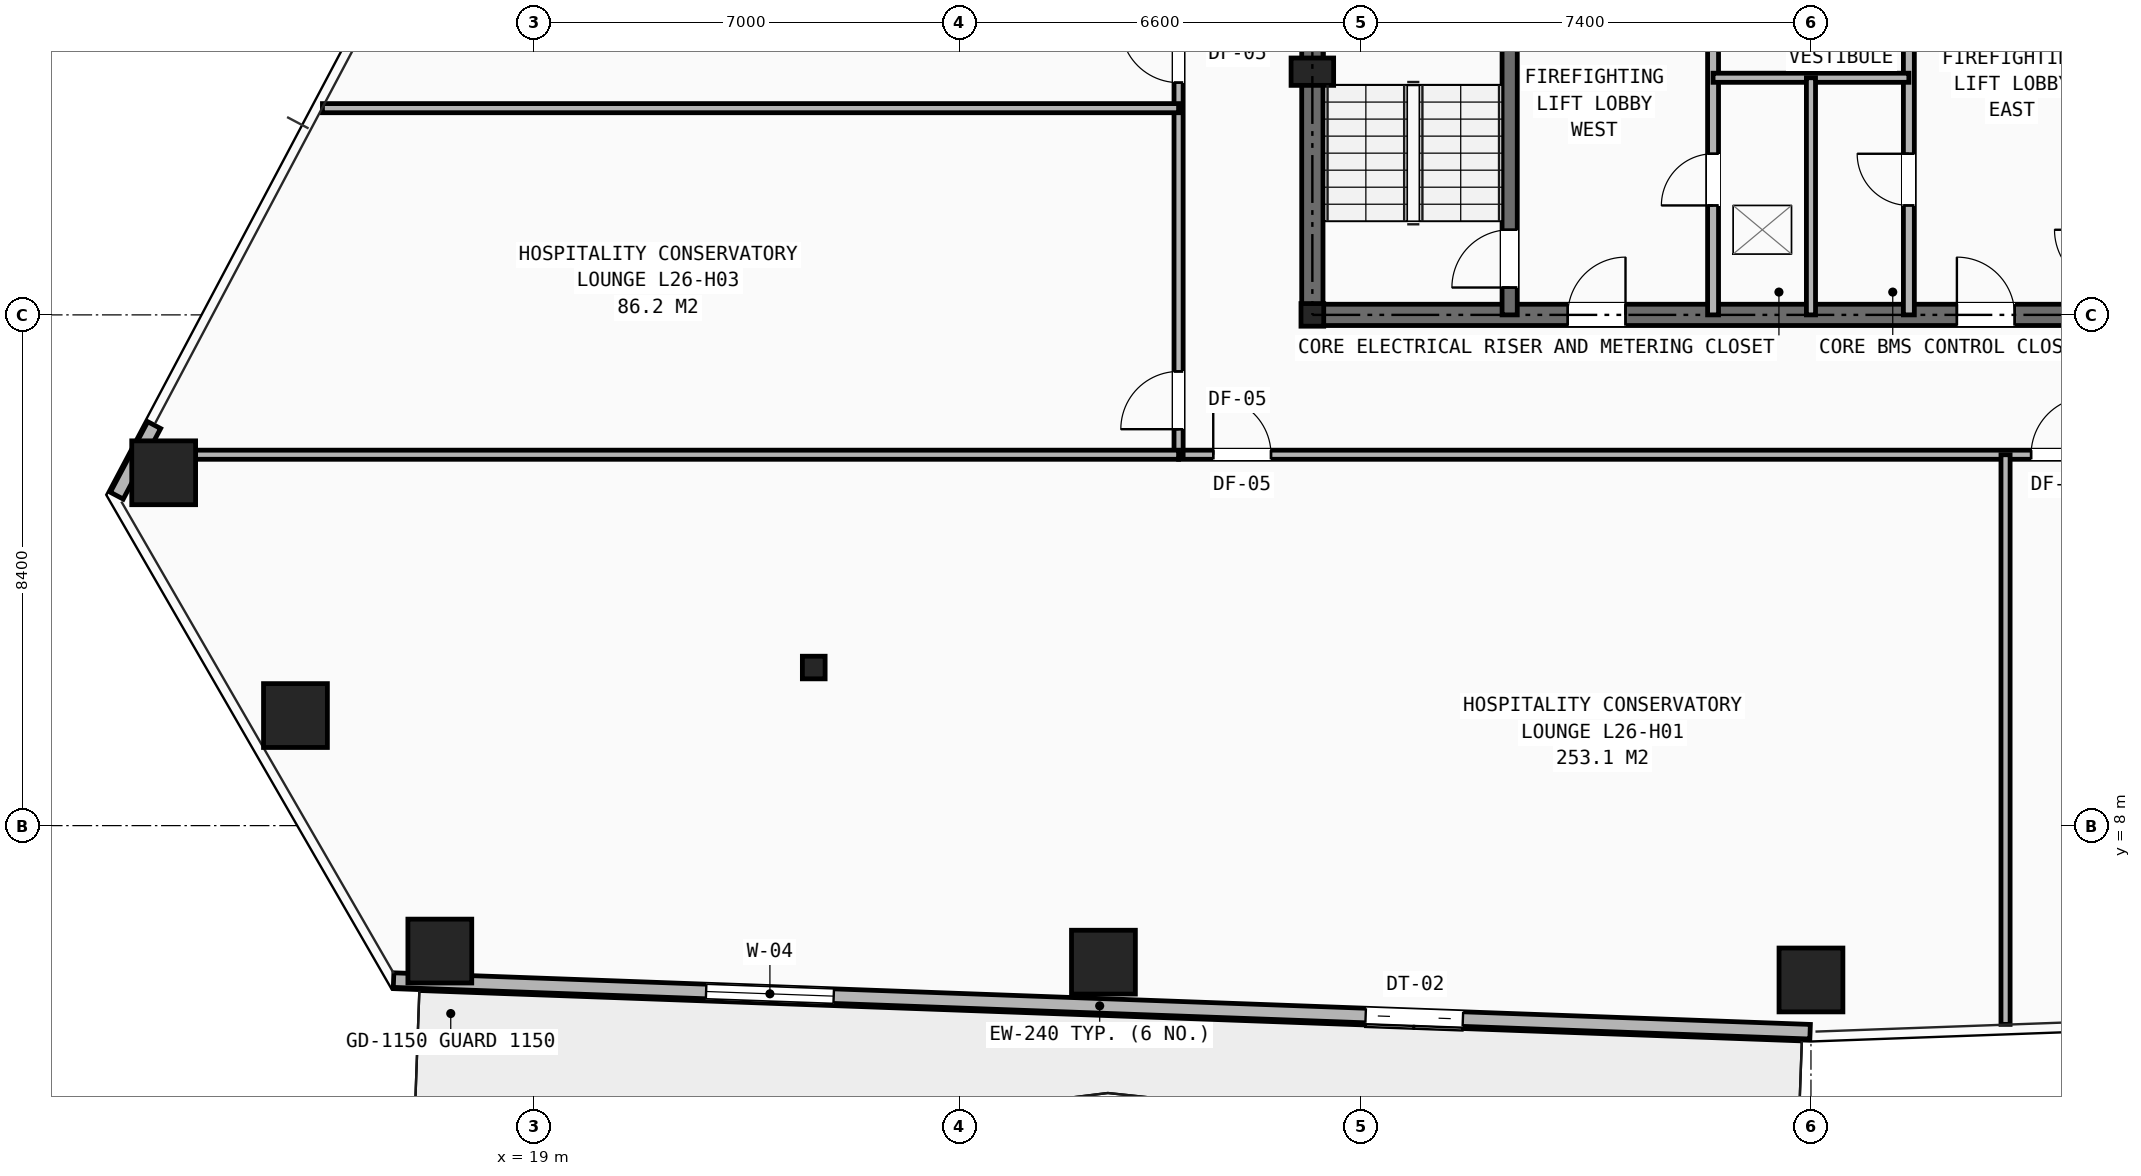
"""IFC4 building model, lengths in metres.
Left out: names, types, materials, properties, quantities, classifications, styles, units other than length and angle.
Written with IfcOpenShell. Run it as: python <this file> out.ifc"""

import sys

from ifc_helpers import new_model, si_unit, direction, frame, frame_2d, origin, origin_2d, place, context, subcontext, project, spatial, rectangle, hollow_rectangle, i_section, extrude, element, fill, save


model = new_model("IFC4")
c1 = context("Model", 3, precision=1e-05, world=origin(), true_north=direction((0.0, 1.0)))
c2 = subcontext(c1, "Body", "Model", "MODEL_VIEW")
j1 = project(units=[si_unit("LENGTHUNIT", "METRE"), si_unit("PLANEANGLEUNIT", "RADIAN")], contexts=[c1])
p1 = place(None, origin())
s1 = spatial("IfcSite", under=j1, at=p1, CompositionType="ELEMENT")
p2 = place(p1, origin())
s2 = spatial("IfcBuilding", under=s1, at=p2, CompositionType="ELEMENT")
p3 = place(p2, frame((0.0, 0.0, 92.6)))
s3 = spatial("IfcBuildingStorey", under=s2, at=p3, CompositionType="ELEMENT", Elevation=92.6)
for number, where, z_axis, x_axis in (
    (1, (31.8, 16.4, 0.0), (0.0, 0.0, 1.0), (1.0, 0.0, 0.0)),
    (2, (23.6, 10.6, 0.0), (0.0, 0.0, 1.0), (1.0, 0.0, 0.0)),
):
    element("IfcColumn", number, at=place(p3, frame(where, z_axis=z_axis, x_axis=x_axis)), inside=s3, PredefinedType="COLUMN", context=c2, shape_type="SweptSolid", body=[
        extrude(i_section(OverallWidth=0.374, OverallDepth=0.372, WebThickness=0.016, FlangeThickness=0.026, at=origin_2d()), origin(), (0.0, 0.0, 1.0), 3.2),
    ])
p4 = place(p3, frame((31.8, 20.4, 0.0), z_axis=(0.0, 0.0, 1.0), x_axis=(1.0, 0.0, 0.0)))
e3 = element("IfcColumn", 3, at=p4, inside=s3, PredefinedType="PILASTER", context=c2, shape_type="SweptSolid", body=[
    extrude(rectangle(XDim=0.7, YDim=0.45, at=origin_2d()), origin(), (0.0, 0.0, 1.0), 3.2),
])
for number, where, z_axis, x_axis in (
    (4, (12.909, 13.803, 0.0), (0.0, 0.0, 1.0), (1.0, 0.0, 0.0)),
    (5, (15.076, 9.81, 0.0), (0.0, 0.0, 1.0), (1.0, 0.0, 0.0)),
    (6, (17.451, 5.937, 0.0), (0.0, 0.0, 1.0), (1.0, 0.0, 0.0)),
    (7, (28.364, 5.754, 0.0), (0.0, 0.0, 1.0), (1.0, 0.0, 0.0)),
    (8, (40.0, 5.461, 0.0), (0.0, 0.0, 1.0), (1.0, 0.0, 0.0)),
):
    element("IfcColumn", number, at=place(p3, frame(where, z_axis=z_axis, x_axis=x_axis)), inside=s3, PredefinedType="COLUMN", context=c2, shape_type="SweptSolid", body=[
        extrude(hollow_rectangle(XDim=1.05, YDim=1.05, WallThickness=0.07, at=origin_2d()), origin(), (0.0, 0.0, 1.0), 3.2),
    ])
p5 = place(p3, frame((12.753, 14.587, 0.0), z_axis=(0.0, 0.0, 1.0), x_axis=(-0.468058524958, -0.883697469281, 0.0)))
e9 = element("IfcWall", 9, at=p5, inside=s3, PredefinedType="SHEAR", context=c2, shape_type="SweptSolid", body=[
    extrude(rectangle(XDim=1.313, YDim=0.24, at=frame_2d((0.657, 0.0))), origin(), (0.0, 0.0, 1.0), 2.253),
])
p6 = place(p3, frame((39.986, 4.61, 0.0), z_axis=(0.0, 0.0, 1.0), x_axis=(-0.999336382455, 0.036425193232, 0.0)))
e10 = element("IfcWall", 10, at=p6, inside=s3, PredefinedType="SHEAR", context=c2, shape_type="SweptSolid", body=[
    extrude(rectangle(XDim=23.311, YDim=0.24, at=frame_2d((11.656, 0.0))), origin(), (0.0, 0.0, 1.0), 2.253),
])
p7 = place(p6, frame((5.714, 0.0, 0.0)))
e11 = element("IfcOpeningElement", 11, at=p7, cuts=e10, PredefinedType="OPENING", context=c2, shape_type="SweptSolid", body=[
    extrude(rectangle(XDim=1.6, YDim=2.04, at=frame_2d((0.8, 1.02))), frame((0.0, 0.13, 0.0), z_axis=(0.0, -1.0, 0.0), x_axis=(1.0, 0.0, 0.0)), (0.0, 0.0, 1.0), 0.26),
])
p8 = place(p6, frame((16.068, 0.0, 0.25)))
e12 = element("IfcOpeningElement", 12, at=p8, cuts=e10, PredefinedType="OPENING", context=c2, shape_type="SweptSolid", body=[
    extrude(rectangle(XDim=2.1, YDim=1.7, at=frame_2d((1.05, 0.85))), frame((0.0, 0.13, 0.0), z_axis=(0.0, -1.0, 0.0), x_axis=(1.0, 0.0, 0.0)), (0.0, 0.0, 1.0), 0.26),
])
p9 = place(p3, frame((31.8, 16.4, 0.0), z_axis=(0.0, 0.0, 1.0), x_axis=(1.0, 0.0, 0.0)))
e13 = element("IfcWall", 13, at=p9, inside=s3, PredefinedType="SHEAR", context=c2, shape_type="SweptSolid", body=[
    extrude(rectangle(XDim=16.4, YDim=0.35, at=frame_2d((8.2, 0.0))), origin(), (0.0, 0.0, 1.0), 2.97),
])
p10 = place(p9, frame((4.2, 0.0, 0.0)))
e14 = element("IfcOpeningElement", 14, at=p10, cuts=e13, PredefinedType="OPENING", context=c2, shape_type="SweptSolid", body=[
    extrude(rectangle(XDim=0.95, YDim=2.1, at=frame_2d((0.475, 1.05))), frame((0.0, 0.185, 0.0), z_axis=(0.0, -1.0, 0.0), x_axis=(1.0, 0.0, 0.0)), (0.0, 0.0, 1.0), 0.37),
])
p11 = place(p9, frame((10.6, 0.0, 0.0)))
e15 = element("IfcOpeningElement", 15, at=p11, cuts=e13, PredefinedType="OPENING", context=c2, shape_type="SweptSolid", body=[
    extrude(rectangle(XDim=0.95, YDim=2.1, at=frame_2d((0.475, 1.05))), frame((0.0, 0.185, 0.0), z_axis=(0.0, -1.0, 0.0), x_axis=(1.0, 0.0, 0.0)), (0.0, 0.0, 1.0), 0.37),
])
p12 = place(p3, frame((31.8, 16.4, 0.0), z_axis=(0.0, 0.0, 1.0), x_axis=(0.0, 1.0, 0.0)))
e16 = element("IfcWall", 16, at=p12, inside=s3, PredefinedType="SHEAR", context=c2, shape_type="SweptSolid", body=[
    extrude(rectangle(XDim=14.8, YDim=0.35, at=frame_2d((7.4, 0.0))), origin(), (0.0, 0.0, 1.0), 2.97),
])
p13 = place(p12, frame((11.0, 0.0, 0.0)))
e17 = element("IfcOpeningElement", 17, at=p13, cuts=e16, PredefinedType="OPENING", context=c2, shape_type="SweptSolid", body=[
    extrude(rectangle(XDim=1.1, YDim=2.15, at=frame_2d((0.55, 1.075))), frame((0.0, 0.185, 0.0), z_axis=(0.0, -1.0, 0.0), x_axis=(1.0, 0.0, 0.0)), (0.0, 0.0, 1.0), 0.37),
])
p14 = place(p3, frame((35.045, 16.4, 0.0), z_axis=(0.0, 0.0, 1.0), x_axis=(0.0, 1.0, 0.0)))
e18 = element("IfcWall", 18, at=p14, inside=s3, PredefinedType="SHEAR", context=c2, shape_type="SweptSolid", body=[
    extrude(rectangle(XDim=8.4, YDim=0.25, at=frame_2d((4.2, 0.0))), origin(), (0.0, 0.0, 1.0), 2.97),
])
p15 = place(p14, frame((0.45, 0.0, 0.0)))
e19 = element("IfcOpeningElement", 19, at=p15, cuts=e18, PredefinedType="OPENING", context=c2, shape_type="SweptSolid", body=[
    extrude(rectangle(XDim=0.95, YDim=2.1, at=frame_2d((0.475, 1.05))), frame((0.0, 0.135, 0.0), z_axis=(0.0, -1.0, 0.0), x_axis=(1.0, 0.0, 0.0)), (0.0, 0.0, 1.0), 0.27),
])
p16 = place(p3, frame((38.39, 16.4, 0.0), z_axis=(0.0, 0.0, 1.0), x_axis=(0.0, 1.0, 0.0)))
e20 = element("IfcWall", 20, at=p16, inside=s3, PredefinedType="PARTITIONING", context=c2, shape_type="SweptSolid", body=[
    extrude(rectangle(XDim=8.4, YDim=0.18, at=frame_2d((4.2, 0.0))), origin(), (0.0, 0.0, 1.0), 2.421),
])
p17 = place(p16, frame((1.8, 0.0, 0.0)))
e21 = element("IfcOpeningElement", 21, at=p17, cuts=e20, PredefinedType="OPENING", context=c2, shape_type="SweptSolid", body=[
    extrude(rectangle(XDim=0.85, YDim=2.05, at=frame_2d((0.425, 1.025))), frame((0.0, 0.1, 0.0), z_axis=(0.0, -1.0, 0.0), x_axis=(1.0, 0.0, 0.0)), (0.0, 0.0, 1.0), 0.2),
])
p18 = place(p16, frame((4.35, 0.0, 0.0)))
e22 = element("IfcOpeningElement", 22, at=p18, cuts=e20, PredefinedType="OPENING", context=c2, shape_type="SweptSolid", body=[
    extrude(rectangle(XDim=0.95, YDim=2.1, at=frame_2d((0.475, 1.05))), frame((0.0, 0.1, 0.0), z_axis=(0.0, -1.0, 0.0), x_axis=(1.0, 0.0, 0.0)), (0.0, 0.0, 1.0), 0.2),
])
p19 = place(p3, frame((41.61, 16.4, 0.0), z_axis=(0.0, 0.0, 1.0), x_axis=(0.0, 1.0, 0.0)))
e23 = element("IfcWall", 23, at=p19, inside=s3, PredefinedType="PARTITIONING", context=c2, shape_type="SweptSolid", body=[
    extrude(rectangle(XDim=8.4, YDim=0.18, at=frame_2d((4.2, 0.0))), origin(), (0.0, 0.0, 1.0), 2.421),
])
p20 = place(p19, frame((1.8, 0.0, 0.0)))
e24 = element("IfcOpeningElement", 24, at=p20, cuts=e23, PredefinedType="OPENING", context=c2, shape_type="SweptSolid", body=[
    extrude(rectangle(XDim=0.85, YDim=2.05, at=frame_2d((0.425, 1.025))), frame((0.0, 0.1, 0.0), z_axis=(0.0, -1.0, 0.0), x_axis=(1.0, 0.0, 0.0)), (0.0, 0.0, 1.0), 0.2),
])
p21 = place(p3, frame((38.39, 20.3, 0.0), z_axis=(0.0, 0.0, 1.0), x_axis=(1.0, 0.0, 0.0)))
e25 = element("IfcWall", 25, at=p21, inside=s3, PredefinedType="PARTITIONING", context=c2, shape_type="SweptSolid", body=[
    extrude(rectangle(XDim=3.22, YDim=0.15, at=frame_2d((1.61, 0.0))), origin(), (0.0, 0.0, 1.0), 2.97),
])
p22 = place(p3, frame((40.0, 16.4, 0.0), z_axis=(0.0, 0.0, 1.0), x_axis=(0.0, 1.0, 0.0)))
e26 = element("IfcWall", 26, at=p22, inside=s3, PredefinedType="PARTITIONING", context=c2, shape_type="SweptSolid", body=[
    extrude(rectangle(XDim=3.9, YDim=0.15, at=frame_2d((1.95, 0.0))), origin(), (0.0, 0.0, 1.0), 2.421),
])
p23 = place(p3, frame((29.6, 14.1, 0.0), z_axis=(0.0, 0.0, 1.0), x_axis=(1.0, 0.0, 0.0)))
e27 = element("IfcWall", 27, at=p23, inside=s3, PredefinedType="PARTITIONING", context=c2, shape_type="SweptSolid", body=[
    extrude(rectangle(XDim=20.8, YDim=0.15, at=frame_2d((10.4, 0.0))), origin(), (0.0, 0.0, 1.0), 2.421),
])
p24 = place(p23, frame((0.57, 0.0, 0.0)))
e28 = element("IfcOpeningElement", 28, at=p24, cuts=e27, PredefinedType="OPENING", context=c2, shape_type="SweptSolid", body=[
    extrude(rectangle(XDim=0.95, YDim=2.1, at=frame_2d((0.475, 1.05))), frame((0.0, 0.085, 0.0), z_axis=(0.0, -1.0, 0.0), x_axis=(1.0, 0.0, 0.0)), (0.0, 0.0, 1.0), 0.17),
])
p25 = place(p23, frame((14.02, 0.0, 0.0)))
e29 = element("IfcOpeningElement", 29, at=p25, cuts=e27, PredefinedType="OPENING", context=c2, shape_type="SweptSolid", body=[
    extrude(rectangle(XDim=0.95, YDim=2.1, at=frame_2d((0.475, 1.05))), frame((0.0, 0.085, 0.0), z_axis=(0.0, -1.0, 0.0), x_axis=(1.0, 0.0, 0.0)), (0.0, 0.0, 1.0), 0.17),
])
p26 = place(p3, frame((29.6, 14.1, 0.0), z_axis=(0.0, 0.0, 1.0), x_axis=(0.0, 1.0, 0.0)))
e30 = element("IfcWall", 30, at=p26, inside=s3, PredefinedType="PARTITIONING", context=c2, shape_type="SweptSolid", body=[
    extrude(rectangle(XDim=21.9, YDim=0.15, at=frame_2d((10.95, 0.0))), origin(), (0.0, 0.0, 1.0), 2.421),
])
p27 = place(p26, frame((0.42, 0.0, 0.0)))
e31 = element("IfcOpeningElement", 31, at=p27, cuts=e30, PredefinedType="OPENING", context=c2, shape_type="SweptSolid", body=[
    extrude(rectangle(XDim=0.95, YDim=2.1, at=frame_2d((0.475, 1.05))), frame((0.0, 0.085, 0.0), z_axis=(0.0, -1.0, 0.0), x_axis=(1.0, 0.0, 0.0)), (0.0, 0.0, 1.0), 0.17),
])
p28 = place(p26, frame((6.12, 0.0, 0.0)))
e32 = element("IfcOpeningElement", 32, at=p28, cuts=e30, PredefinedType="OPENING", context=c2, shape_type="SweptSolid", body=[
    extrude(rectangle(XDim=0.95, YDim=2.1, at=frame_2d((0.475, 1.05))), frame((0.0, 0.085, 0.0), z_axis=(0.0, -1.0, 0.0), x_axis=(1.0, 0.0, 0.0)), (0.0, 0.0, 1.0), 0.17),
])
p29 = place(p26, frame((14.12, 0.0, 0.0)))
e33 = element("IfcOpeningElement", 33, at=p29, cuts=e30, PredefinedType="OPENING", context=c2, shape_type="SweptSolid", body=[
    extrude(rectangle(XDim=0.95, YDim=2.1, at=frame_2d((0.475, 1.05))), frame((0.0, 0.085, 0.0), z_axis=(0.0, -1.0, 0.0), x_axis=(1.0, 0.0, 0.0)), (0.0, 0.0, 1.0), 0.17),
])
p30 = place(p3, frame((43.2, 4.731, 0.0), z_axis=(0.0, 0.0, 1.0), x_axis=(0.0, 1.0, 0.0)))
e34 = element("IfcWall", 34, at=p30, inside=s3, PredefinedType="PARTITIONING", context=c2, shape_type="SweptSolid", body=[
    extrude(rectangle(XDim=9.369, YDim=0.15, at=frame_2d((4.685, 0.0))), origin(), (0.0, 0.0, 1.0), 2.258),
])
p31 = place(p3, frame((12.5, 14.1, 0.0), z_axis=(0.0, 0.0, 1.0), x_axis=(1.0, 0.0, 0.0)))
e35 = element("IfcWall", 35, at=p31, inside=s3, PredefinedType="PARTITIONING", context=c2, shape_type="SweptSolid", body=[
    extrude(rectangle(XDim=17.1, YDim=0.15, at=frame_2d((8.55, 0.0))), origin(), (0.0, 0.0, 1.0), 2.258),
])
p32 = place(p3, frame((15.52, 19.8, 0.0), z_axis=(0.0, 0.0, 1.0), x_axis=(1.0, 0.0, 0.0)))
e36 = element("IfcWall", 36, at=p32, inside=s3, PredefinedType="PARTITIONING", context=c2, shape_type="SweptSolid", body=[
    extrude(rectangle(XDim=14.08, YDim=0.15, at=frame_2d((7.04, 0.0))), origin(), (0.0, 0.0, 1.0), 2.258),
])
p33 = place(p7, origin())
e37 = element("IfcDoor", 37, at=p33, inside=s3, OperationType="SINGLE_SWING_LEFT", PredefinedType="DOOR", context=c2, shape_type="SweptSolid", body=[
    extrude(rectangle(XDim=1.6, YDim=2.04, at=frame_2d((0.8, 1.02))), frame((0.0, 0.025, 0.0), z_axis=(0.0, -1.0, 0.0), x_axis=(1.0, 0.0, 0.0)), (0.0, 0.0, 1.0), 0.05),
])
fill(e11, e37)
p34 = place(p8, origin())
e38 = element("IfcWindow", 38, at=p34, inside=s3, PartitioningType="SINGLE_PANEL", PredefinedType="WINDOW", context=c2, shape_type="SweptSolid", body=[
    extrude(rectangle(XDim=2.1, YDim=1.7, at=frame_2d((1.05, 0.85))), frame((0.0, 0.03, 0.0), z_axis=(0.0, -1.0, 0.0), x_axis=(1.0, 0.0, 0.0)), (0.0, 0.0, 1.0), 0.06),
])
fill(e12, e38)
p35 = place(p17, origin())
e39 = element("IfcDoor", 39, at=p35, inside=s3, OperationType="SINGLE_SWING_LEFT", PredefinedType="DOOR", context=c2, shape_type="SweptSolid", body=[
    extrude(rectangle(XDim=0.85, YDim=2.05, at=frame_2d((0.425, 1.025))), frame((0.0, 0.025, 0.0), z_axis=(0.0, -1.0, 0.0), x_axis=(1.0, 0.0, 0.0)), (0.0, 0.0, 1.0), 0.05),
])
fill(e21, e39)
p36 = place(p20, origin())
e40 = element("IfcDoor", 40, at=p36, inside=s3, OperationType="SINGLE_SWING_RIGHT", PredefinedType="DOOR", context=c2, shape_type="SweptSolid", body=[
    extrude(rectangle(XDim=0.85, YDim=2.05, at=frame_2d((0.425, 1.025))), frame((0.0, 0.025, 0.0), z_axis=(0.0, -1.0, 0.0), x_axis=(1.0, 0.0, 0.0)), (0.0, 0.0, 1.0), 0.05),
])
fill(e24, e40)
p37 = place(p15, origin())
e41 = element("IfcDoor", 41, at=p37, inside=s3, OperationType="SINGLE_SWING_LEFT", PredefinedType="DOOR", context=c2, shape_type="SweptSolid", body=[
    extrude(rectangle(XDim=0.95, YDim=2.1, at=frame_2d((0.475, 1.05))), frame((0.0, 0.025, 0.0), z_axis=(0.0, -1.0, 0.0), x_axis=(1.0, 0.0, 0.0)), (0.0, 0.0, 1.0), 0.05),
])
fill(e19, e41)
p38 = place(p10, origin())
e42 = element("IfcDoor", 42, at=p38, inside=s3, OperationType="SINGLE_SWING_RIGHT", PredefinedType="DOOR", context=c2, shape_type="SweptSolid", body=[
    extrude(rectangle(XDim=0.95, YDim=2.1, at=frame_2d((0.475, 1.05))), frame((0.0, 0.025, 0.0), z_axis=(0.0, -1.0, 0.0), x_axis=(1.0, 0.0, 0.0)), (0.0, 0.0, 1.0), 0.05),
])
fill(e14, e42)
p39 = place(p11, origin())
e43 = element("IfcDoor", 43, at=p39, inside=s3, OperationType="SINGLE_SWING_LEFT", PredefinedType="DOOR", context=c2, shape_type="SweptSolid", body=[
    extrude(rectangle(XDim=0.95, YDim=2.1, at=frame_2d((0.475, 1.05))), frame((0.0, 0.025, 0.0), z_axis=(0.0, -1.0, 0.0), x_axis=(1.0, 0.0, 0.0)), (0.0, 0.0, 1.0), 0.05),
])
fill(e15, e43)
p40 = place(p24, origin())
e44 = element("IfcDoor", 44, at=p40, inside=s3, OperationType="SINGLE_SWING_LEFT", PredefinedType="DOOR", context=c2, shape_type="SweptSolid", body=[
    extrude(rectangle(XDim=0.95, YDim=2.1, at=frame_2d((0.475, 1.05))), frame((0.0, 0.025, 0.0), z_axis=(0.0, -1.0, 0.0), x_axis=(1.0, 0.0, 0.0)), (0.0, 0.0, 1.0), 0.05),
])
fill(e28, e44)
p41 = place(p25, origin())
e45 = element("IfcDoor", 45, at=p41, inside=s3, OperationType="SINGLE_SWING_RIGHT", PredefinedType="DOOR", context=c2, shape_type="SweptSolid", body=[
    extrude(rectangle(XDim=0.95, YDim=2.1, at=frame_2d((0.475, 1.05))), frame((0.0, 0.025, 0.0), z_axis=(0.0, -1.0, 0.0), x_axis=(1.0, 0.0, 0.0)), (0.0, 0.0, 1.0), 0.05),
])
fill(e29, e45)
p42 = place(p27, origin())
e46 = element("IfcDoor", 46, at=p42, inside=s3, OperationType="SINGLE_SWING_LEFT", PredefinedType="DOOR", context=c2, shape_type="SweptSolid", body=[
    extrude(rectangle(XDim=0.95, YDim=2.1, at=frame_2d((0.475, 1.05))), frame((0.0, 0.025, 0.0), z_axis=(0.0, -1.0, 0.0), x_axis=(1.0, 0.0, 0.0)), (0.0, 0.0, 1.0), 0.05),
])
fill(e31, e46)
p43 = place(p28, origin())
e47 = element("IfcDoor", 47, at=p43, inside=s3, OperationType="SINGLE_SWING_RIGHT", PredefinedType="DOOR", context=c2, shape_type="SweptSolid", body=[
    extrude(rectangle(XDim=0.95, YDim=2.1, at=frame_2d((0.475, 1.05))), frame((0.0, 0.025, 0.0), z_axis=(0.0, -1.0, 0.0), x_axis=(1.0, 0.0, 0.0)), (0.0, 0.0, 1.0), 0.05),
])
fill(e32, e47)
save(model, sys.argv[1])
